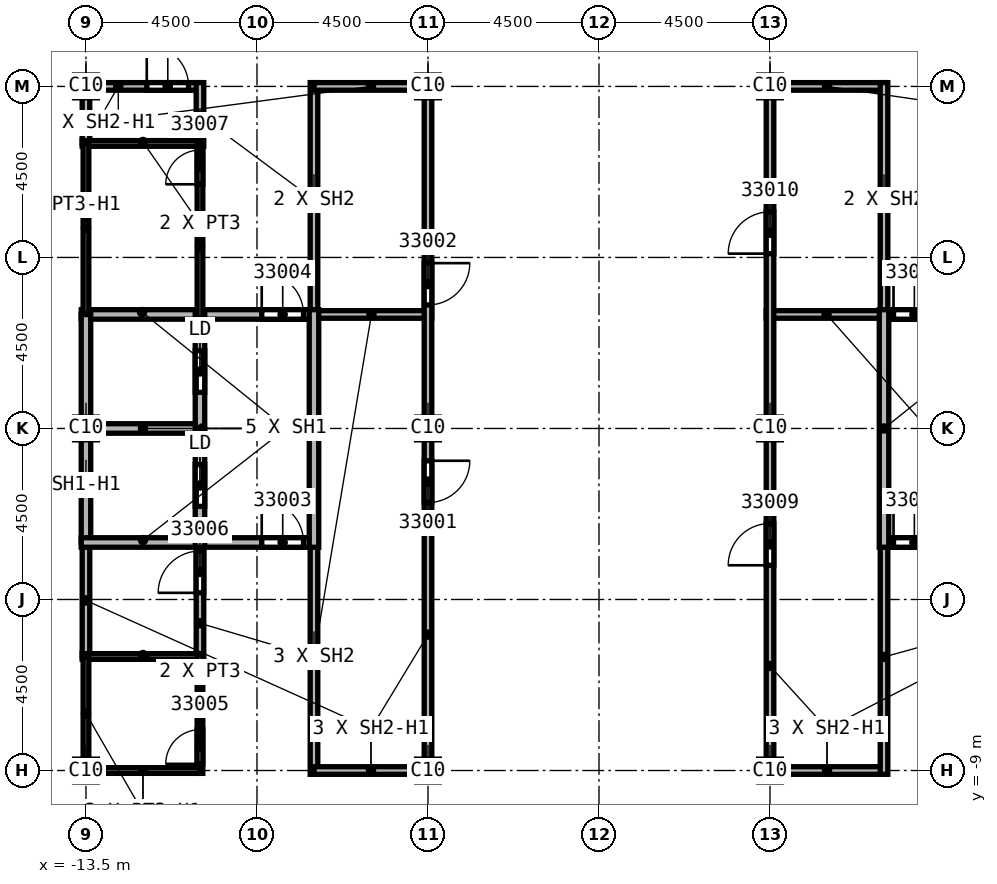
"""IFC4 building model, lengths in metres.
Left out: names, types, materials, properties, quantities, classifications, styles, units other than length and angle.
Written with IfcOpenShell. Run it as: python <this file> out.ifc"""

import sys

from ifc_helpers import new_model, si_unit, direction, frame, frame_2d, origin, origin_2d, place, context, subcontext, project, spatial, rectangle, extrude, element, fill, save


model = new_model("IFC4")
c1 = context("Model", 3, precision=1e-05, world=origin(), true_north=direction((0.0, 1.0)))
c2 = subcontext(c1, "Body", "Model", "MODEL_VIEW")
j1 = project(units=[si_unit("LENGTHUNIT", "METRE"), si_unit("PLANEANGLEUNIT", "RADIAN")], contexts=[c1])
p1 = place(None, origin())
s1 = spatial("IfcSite", under=j1, at=p1, CompositionType="ELEMENT")
p2 = place(p1, origin())
s2 = spatial("IfcBuilding", under=s1, at=p2, CompositionType="ELEMENT")
p3 = place(p2, frame((0.0, 0.0, 361.0)))
s3 = spatial("IfcBuildingStorey", under=s2, at=p3, CompositionType="ELEMENT", Elevation=361.0)
for number, where, z_axis, x_axis in (
    (1, (4.5, 0.0, 0.0), (0.0, 0.0, 1.0), (1.0, 0.0, 0.0)),
    (2, (4.5, 9.0, 0.0), (0.0, 0.0, 1.0), (1.0, 0.0, 0.0)),
    (3, (4.5, -9.0, 0.0), (0.0, 0.0, 1.0), (1.0, 0.0, 0.0)),
    (4, (-4.5, 0.0, 0.0), (0.0, 0.0, 1.0), (1.0, 0.0, 0.0)),
    (5, (-4.5, 9.0, 0.0), (0.0, 0.0, 1.0), (1.0, 0.0, 0.0)),
    (6, (-4.5, -9.0, 0.0), (0.0, 0.0, 1.0), (1.0, 0.0, 0.0)),
    (7, (-13.5, 0.0, 0.0), (0.0, 0.0, 1.0), (1.0, 0.0, 0.0)),
    (8, (-13.5, 9.0, 0.0), (0.0, 0.0, 1.0), (1.0, 0.0, 0.0)),
    (9, (-13.5, -9.0, 0.0), (0.0, 0.0, 1.0), (1.0, 0.0, 0.0)),
):
    element("IfcColumn", number, at=place(p3, frame(where, z_axis=z_axis, x_axis=x_axis)), inside=s3, PredefinedType="COLUMN", context=c2, shape_type="SweptSolid", body=[
        extrude(rectangle(XDim=0.6, YDim=0.6, at=origin_2d()), origin(), (0.0, 0.0, 1.0), 4.6),
    ])
p4 = place(p3, frame((-13.5, -6.0, 0.0), z_axis=(0.0, 0.0, 1.0), x_axis=(0.0, 1.0, 0.0)))
e10 = element("IfcWall", 10, at=p4, inside=s3, PredefinedType="SOLIDWALL", context=c2, shape_type="SweptSolid", body=[
    extrude(rectangle(XDim=3.0, YDim=0.2, at=frame_2d((1.5, 0.0))), origin(), (0.0, 0.0, 1.0), 3.838),
])
p5 = place(p3, frame((-13.5, 7.5, 0.0), z_axis=(0.0, 0.0, 1.0), x_axis=(0.0, 1.0, 0.0)))
e11 = element("IfcWall", 11, at=p5, inside=s3, PredefinedType="SOLIDWALL", context=c2, shape_type="SweptSolid", body=[
    extrude(rectangle(XDim=1.6, YDim=0.2, at=frame_2d((0.8, 0.0))), origin(), (0.0, 0.0, 1.0), 3.838),
])
p6 = place(p3, frame((-13.5, 9.0, 0.0), z_axis=(0.0, 0.0, 1.0), x_axis=(1.0, 0.0, 0.0)))
e12 = element("IfcWall", 12, at=p6, inside=s3, PredefinedType="SOLIDWALL", context=c2, shape_type="SweptSolid", body=[
    extrude(rectangle(XDim=3.0, YDim=0.2, at=frame_2d((1.5, 0.0))), origin(), (0.0, 0.0, 1.0), 3.838),
])
p7 = place(p6, frame((1.6, 0.0, 0.0)))
e13 = element("IfcOpeningElement", 13, at=p7, cuts=e12, PredefinedType="OPENING", context=c2, shape_type="SweptSolid", body=[
    extrude(rectangle(XDim=1.1, YDim=2.1, at=frame_2d((0.55, 1.05))), frame((0.0, 0.1, 0.0), z_axis=(0.0, -1.0, 0.0), x_axis=(1.0, 0.0, 0.0)), (0.0, 0.0, 1.0), 0.2),
])
p8 = place(p3, frame((-10.5, -6.075, 0.0), z_axis=(0.0, 0.0, 1.0), x_axis=(0.0, 1.0, 0.0)))
e14 = element("IfcWall", 14, at=p8, inside=s3, PredefinedType="SOLIDWALL", context=c2, shape_type="SweptSolid", body=[
    extrude(rectangle(XDim=3.2, YDim=0.2, at=frame_2d((1.6, 0.0))), origin(), (0.0, 0.0, 1.0), 4.15),
])
p9 = place(p8, frame((1.75, 0.0, 0.0)))
e15 = element("IfcOpeningElement", 15, at=p9, cuts=e14, PredefinedType="OPENING", context=c2, shape_type="SweptSolid", body=[
    extrude(rectangle(XDim=1.1, YDim=2.1, at=frame_2d((0.55, 1.05))), frame((0.0, 0.1, 0.0), z_axis=(0.0, -1.0, 0.0), x_axis=(1.0, 0.0, 0.0)), (0.0, 0.0, 1.0), 0.2),
])
p10 = place(p3, frame((-10.5, 7.425, 0.0), z_axis=(0.0, 0.0, 1.0), x_axis=(0.0, 1.0, 0.0)))
e16 = element("IfcWall", 16, at=p10, inside=s3, PredefinedType="SOLIDWALL", context=c2, shape_type="SweptSolid", body=[
    extrude(rectangle(XDim=1.675, YDim=0.2, at=frame_2d((0.837, 0.0))), origin(), (0.0, 0.0, 1.0), 4.15),
])
p11 = place(p3, frame((-7.625, 3.0, 0.0), z_axis=(0.0, 0.0, 1.0), x_axis=(1.0, 0.0, 0.0)))
e17 = element("IfcWall", 17, at=p11, inside=s3, PredefinedType="SOLIDWALL", context=c2, shape_type="SweptSolid", body=[
    extrude(rectangle(XDim=3.225, YDim=0.2, at=frame_2d((1.613, 0.0))), origin(), (0.0, 0.0, 1.0), 4.15),
])
for number, where, z_axis, x_axis in (
    (18, (-7.5, -9.1, 0.0), (0.0, 0.0, 1.0), (0.0, 1.0, 0.0)),
    (19, (-7.5, 2.875, 0.0), (0.0, 0.0, 1.0), (0.0, 1.0, 0.0)),
):
    element("IfcWall", number, at=place(p3, frame(where, z_axis=z_axis, x_axis=x_axis)), inside=s3, PredefinedType="SOLIDWALL", context=c2, shape_type="SweptSolid", body=[
        extrude(rectangle(XDim=6.225, YDim=0.2, at=frame_2d((3.113, 0.0))), origin(), (0.0, 0.0, 1.0), 4.15),
    ])
for number, where, z_axis, x_axis in (
    (20, (-7.5, 9.0, 0.0), (0.0, 0.0, 1.0), (1.0, 0.0, 0.0)),
    (21, (-4.5, -9.0, 0.0), (0.0, 0.0, 1.0), (-1.0, 0.0, 0.0)),
):
    element("IfcWall", number, at=place(p3, frame(where, z_axis=z_axis, x_axis=x_axis)), inside=s3, PredefinedType="SOLIDWALL", context=c2, shape_type="SweptSolid", body=[
        extrude(rectangle(XDim=3.0, YDim=0.2, at=frame_2d((1.5, 0.0))), origin(), (0.0, 0.0, 1.0), 3.838),
    ])
p12 = place(p3, frame((-4.5, 9.1, 0.0), z_axis=(0.0, 0.0, 1.0), x_axis=(0.0, -1.0, 0.0)))
e22 = element("IfcWall", 22, at=p12, inside=s3, PredefinedType="SOLIDWALL", context=c2, shape_type="SweptSolid", body=[
    extrude(rectangle(XDim=18.2, YDim=0.2, at=frame_2d((9.1, 0.0))), origin(), (0.0, 0.0, 1.0), 3.838),
])
p13 = place(p12, frame((9.95, 0.0, 0.0)))
e23 = element("IfcOpeningElement", 23, at=p13, cuts=e22, PredefinedType="OPENING", context=c2, shape_type="SweptSolid", body=[
    extrude(rectangle(XDim=1.1, YDim=2.1, at=frame_2d((0.55, 1.05))), frame((0.0, 0.1, 0.0), z_axis=(0.0, -1.0, 0.0), x_axis=(1.0, 0.0, 0.0)), (0.0, 0.0, 1.0), 0.2),
])
p14 = place(p12, frame((4.75, 0.0, 0.0)))
e24 = element("IfcOpeningElement", 24, at=p14, cuts=e22, PredefinedType="OPENING", context=c2, shape_type="SweptSolid", body=[
    extrude(rectangle(XDim=1.1, YDim=2.1, at=frame_2d((0.55, 1.05))), frame((0.0, 0.1, 0.0), z_axis=(0.0, -1.0, 0.0), x_axis=(1.0, 0.0, 0.0)), (0.0, 0.0, 1.0), 0.2),
])
p15 = place(p3, frame((4.4, 3.0, 0.0), z_axis=(0.0, 0.0, 1.0), x_axis=(1.0, 0.0, 0.0)))
e25 = element("IfcWall", 25, at=p15, inside=s3, PredefinedType="SOLIDWALL", context=c2, shape_type="SweptSolid", body=[
    extrude(rectangle(XDim=3.225, YDim=0.2, at=frame_2d((1.613, 0.0))), origin(), (0.0, 0.0, 1.0), 4.15),
])
p16 = place(p3, frame((4.5, -9.1, 0.0), z_axis=(0.0, 0.0, 1.0), x_axis=(0.0, 1.0, 0.0)))
e26 = element("IfcWall", 26, at=p16, inside=s3, PredefinedType="SOLIDWALL", context=c2, shape_type="SweptSolid", body=[
    extrude(rectangle(XDim=18.2, YDim=0.2, at=frame_2d((9.1, 0.0))), origin(), (0.0, 0.0, 1.0), 3.838),
])
p17 = place(p16, frame((5.5, 0.0, 0.0)))
e27 = element("IfcOpeningElement", 27, at=p17, cuts=e26, PredefinedType="OPENING", context=c2, shape_type="SweptSolid", body=[
    extrude(rectangle(XDim=1.1, YDim=2.1, at=frame_2d((0.55, 1.05))), frame((0.0, 0.1, 0.0), z_axis=(0.0, -1.0, 0.0), x_axis=(1.0, 0.0, 0.0)), (0.0, 0.0, 1.0), 0.2),
])
p18 = place(p16, frame((13.7, 0.0, 0.0)))
e28 = element("IfcOpeningElement", 28, at=p18, cuts=e26, PredefinedType="OPENING", context=c2, shape_type="SweptSolid", body=[
    extrude(rectangle(XDim=1.1, YDim=2.1, at=frame_2d((0.55, 1.05))), frame((0.0, 0.1, 0.0), z_axis=(0.0, -1.0, 0.0), x_axis=(1.0, 0.0, 0.0)), (0.0, 0.0, 1.0), 0.2),
])
for number, where, z_axis, x_axis in (
    (29, (4.5, 9.0, 0.0), (0.0, 0.0, 1.0), (1.0, 0.0, 0.0)),
    (30, (7.5, -9.0, 0.0), (0.0, 0.0, 1.0), (-1.0, 0.0, 0.0)),
):
    element("IfcWall", number, at=place(p3, frame(where, z_axis=z_axis, x_axis=x_axis)), inside=s3, PredefinedType="SOLIDWALL", context=c2, shape_type="SweptSolid", body=[
        extrude(rectangle(XDim=3.0, YDim=0.2, at=frame_2d((1.5, 0.0))), origin(), (0.0, 0.0, 1.0), 3.838),
    ])
for number, where, z_axis, x_axis in (
    (31, (7.5, -2.875, 0.0), (0.0, 0.0, 1.0), (0.0, -1.0, 0.0)),
    (32, (7.5, 9.1, 0.0), (0.0, 0.0, 1.0), (0.0, -1.0, 0.0)),
):
    element("IfcWall", number, at=place(p3, frame(where, z_axis=z_axis, x_axis=x_axis)), inside=s3, PredefinedType="SOLIDWALL", context=c2, shape_type="SweptSolid", body=[
        extrude(rectangle(XDim=6.225, YDim=0.2, at=frame_2d((3.113, 0.0))), origin(), (0.0, 0.0, 1.0), 4.15),
    ])
p19 = place(p3, frame((-13.625, 0.0, 0.0), z_axis=(0.0, 0.0, 1.0), x_axis=(1.0, 0.0, 0.0)))
e33 = element("IfcWall", 33, at=p19, inside=s3, PredefinedType="SOLIDWALL", context=c2, shape_type="SweptSolid", body=[
    extrude(rectangle(XDim=3.125, YDim=0.25, at=frame_2d((1.562, 0.0))), origin(), (0.0, 0.0, 1.0), 4.15),
])
p20 = place(p3, frame((-13.625, 3.0, 0.0), z_axis=(0.0, 0.0, 1.0), x_axis=(1.0, 0.0, 0.0)))
e34 = element("IfcWall", 34, at=p20, inside=s3, PredefinedType="SOLIDWALL", context=c2, shape_type="SweptSolid", body=[
    extrude(rectangle(XDim=6.125, YDim=0.25, at=frame_2d((3.062, 0.0))), origin(), (0.0, 0.0, 1.0), 4.15),
])
p21 = place(p20, frame((4.75, 0.0, 0.0)))
e35 = element("IfcOpeningElement", 35, at=p21, cuts=e34, PredefinedType="OPENING", context=c2, shape_type="SweptSolid", body=[
    extrude(rectangle(XDim=1.1, YDim=2.1, at=frame_2d((0.55, 1.05))), frame((0.0, 0.125, 0.0), z_axis=(0.0, -1.0, 0.0), x_axis=(1.0, 0.0, 0.0)), (0.0, 0.0, 1.0), 0.25),
])
p22 = place(p3, frame((-13.5, -3.0, 0.0), z_axis=(0.0, 0.0, 1.0), x_axis=(0.0, 1.0, 0.0)))
e36 = element("IfcWall", 36, at=p22, inside=s3, PredefinedType="SOLIDWALL", context=c2, shape_type="SweptSolid", body=[
    extrude(rectangle(XDim=6.0, YDim=0.25, at=frame_2d((3.0, 0.0))), origin(), (0.0, 0.0, 1.0), 3.838),
])
p23 = place(p3, frame((-13.625, -3.0, 0.0), z_axis=(0.0, 0.0, 1.0), x_axis=(1.0, 0.0, 0.0)))
e37 = element("IfcWall", 37, at=p23, inside=s3, PredefinedType="SOLIDWALL", context=c2, shape_type="SweptSolid", body=[
    extrude(rectangle(XDim=6.125, YDim=0.25, at=frame_2d((3.062, 0.0))), origin(), (0.0, 0.0, 1.0), 4.15),
])
p24 = place(p23, frame((4.75, 0.0, 0.0)))
e38 = element("IfcOpeningElement", 38, at=p24, cuts=e37, PredefinedType="OPENING", context=c2, shape_type="SweptSolid", body=[
    extrude(rectangle(XDim=1.1, YDim=2.1, at=frame_2d((0.55, 1.05))), frame((0.0, 0.125, 0.0), z_axis=(0.0, -1.0, 0.0), x_axis=(1.0, 0.0, 0.0)), (0.0, 0.0, 1.0), 0.25),
])
p25 = place(p3, frame((-10.5, -3.125, 0.0), z_axis=(0.0, 0.0, 1.0), x_axis=(0.0, 1.0, 0.0)))
e39 = element("IfcWall", 39, at=p25, inside=s3, PredefinedType="SOLIDWALL", context=c2, shape_type="SweptSolid", body=[
    extrude(rectangle(XDim=6.25, YDim=0.25, at=frame_2d((3.125, 0.0))), origin(), (0.0, 0.0, 1.0), 4.15),
])
p26 = place(p25, frame((1.075, 0.0, 0.0)))
e40 = element("IfcOpeningElement", 40, at=p26, cuts=e39, PredefinedType="OPENING", context=c2, shape_type="SweptSolid", body=[
    extrude(rectangle(XDim=1.1, YDim=2.1, at=frame_2d((0.55, 1.05))), frame((0.0, 0.125, 0.0), z_axis=(0.0, -1.0, 0.0), x_axis=(1.0, 0.0, 0.0)), (0.0, 0.0, 1.0), 0.25),
])
p27 = place(p25, frame((4.075, 0.0, 0.0)))
e41 = element("IfcOpeningElement", 41, at=p27, cuts=e39, PredefinedType="OPENING", context=c2, shape_type="SweptSolid", body=[
    extrude(rectangle(XDim=1.1, YDim=2.1, at=frame_2d((0.55, 1.05))), frame((0.0, 0.125, 0.0), z_axis=(0.0, -1.0, 0.0), x_axis=(1.0, 0.0, 0.0)), (0.0, 0.0, 1.0), 0.25),
])
p28 = place(p3, frame((-7.5, -3.125, 0.0), z_axis=(0.0, 0.0, 1.0), x_axis=(0.0, 1.0, 0.0)))
e42 = element("IfcWall", 42, at=p28, inside=s3, PredefinedType="SOLIDWALL", context=c2, shape_type="SweptSolid", body=[
    extrude(rectangle(XDim=6.25, YDim=0.25, at=frame_2d((3.125, 0.0))), origin(), (0.0, 0.0, 1.0), 4.15),
])
p29 = place(p3, frame((7.5, -3.0, 0.0), z_axis=(0.0, 0.0, 1.0), x_axis=(1.0, 0.0, 0.0)))
e43 = element("IfcWall", 43, at=p29, inside=s3, PredefinedType="SOLIDWALL", context=c2, shape_type="SweptSolid", body=[
    extrude(rectangle(XDim=6.125, YDim=0.25, at=frame_2d((3.062, 0.0))), origin(), (0.0, 0.0, 1.0), 4.15),
])
p30 = place(p29, frame((0.25, 0.0, 0.0)))
e44 = element("IfcOpeningElement", 44, at=p30, cuts=e43, PredefinedType="OPENING", context=c2, shape_type="SweptSolid", body=[
    extrude(rectangle(XDim=1.1, YDim=2.1, at=frame_2d((0.55, 1.05))), frame((0.0, 0.125, 0.0), z_axis=(0.0, -1.0, 0.0), x_axis=(1.0, 0.0, 0.0)), (0.0, 0.0, 1.0), 0.25),
])
p31 = place(p3, frame((7.5, 3.0, 0.0), z_axis=(0.0, 0.0, 1.0), x_axis=(1.0, 0.0, 0.0)))
e45 = element("IfcWall", 45, at=p31, inside=s3, PredefinedType="SOLIDWALL", context=c2, shape_type="SweptSolid", body=[
    extrude(rectangle(XDim=6.125, YDim=0.25, at=frame_2d((3.062, 0.0))), origin(), (0.0, 0.0, 1.0), 4.15),
])
p32 = place(p31, frame((0.25, 0.0, 0.0)))
e46 = element("IfcOpeningElement", 46, at=p32, cuts=e45, PredefinedType="OPENING", context=c2, shape_type="SweptSolid", body=[
    extrude(rectangle(XDim=1.1, YDim=2.1, at=frame_2d((0.55, 1.05))), frame((0.0, 0.125, 0.0), z_axis=(0.0, -1.0, 0.0), x_axis=(1.0, 0.0, 0.0)), (0.0, 0.0, 1.0), 0.25),
])
p33 = place(p3, frame((7.5, 3.125, 0.0), z_axis=(0.0, 0.0, 1.0), x_axis=(0.0, -1.0, 0.0)))
e47 = element("IfcWall", 47, at=p33, inside=s3, PredefinedType="SOLIDWALL", context=c2, shape_type="SweptSolid", body=[
    extrude(rectangle(XDim=6.25, YDim=0.25, at=frame_2d((3.125, 0.0))), origin(), (0.0, 0.0, 1.0), 4.15),
])
for number, where, z_axis, x_axis in (
    (48, (-13.6, -6.0, 0.0), (0.0, 0.0, 1.0), (1.0, 0.0, 0.0)),
    (49, (-13.6, 7.5, 0.0), (0.0, 0.0, 1.0), (1.0, 0.0, 0.0)),
):
    element("IfcWall", number, at=place(p3, frame(where, z_axis=z_axis, x_axis=x_axis)), inside=s3, PredefinedType="PARTITIONING", context=c2, shape_type="SweptSolid", body=[
        extrude(rectangle(XDim=3.1, YDim=0.15, at=frame_2d((1.55, 0.0))), origin(), (0.0, 0.0, 1.0), 4.15),
    ])
p34 = place(p3, frame((-13.5, -9.075, 0.0), z_axis=(0.0, 0.0, 1.0), x_axis=(0.0, 1.0, 0.0)))
e50 = element("IfcWall", 50, at=p34, inside=s3, PredefinedType="PARTITIONING", context=c2, shape_type="SweptSolid", body=[
    extrude(rectangle(XDim=3.075, YDim=0.15, at=frame_2d((1.538, 0.0))), origin(), (0.0, 0.0, 1.0), 3.838),
])
p35 = place(p3, frame((-13.5, 3.0, 0.0), z_axis=(0.0, 0.0, 1.0), x_axis=(0.0, 1.0, 0.0)))
e51 = element("IfcWall", 51, at=p35, inside=s3, PredefinedType="PARTITIONING", context=c2, shape_type="SweptSolid", body=[
    extrude(rectangle(XDim=4.5, YDim=0.15, at=frame_2d((2.25, 0.0))), origin(), (0.0, 0.0, 1.0), 3.838),
])
p36 = place(p3, frame((-10.5, -9.075, 0.0), z_axis=(0.0, 0.0, 1.0), x_axis=(0.0, 1.0, 0.0)))
e52 = element("IfcWall", 52, at=p36, inside=s3, PredefinedType="PARTITIONING", context=c2, shape_type="SweptSolid", body=[
    extrude(rectangle(XDim=3.15, YDim=0.15, at=frame_2d((1.575, 0.0))), origin(), (0.0, 0.0, 1.0), 4.15),
])
p37 = place(p36, frame((0.25, 0.0, 0.0)))
e53 = element("IfcOpeningElement", 53, at=p37, cuts=e52, PredefinedType="OPENING", context=c2, shape_type="SweptSolid", body=[
    extrude(rectangle(XDim=0.9, YDim=2.1, at=frame_2d((0.45, 1.05))), frame((0.0, 0.075, 0.0), z_axis=(0.0, -1.0, 0.0), x_axis=(1.0, 0.0, 0.0)), (0.0, 0.0, 1.0), 0.15),
])
p38 = place(p3, frame((-10.5, -9.0, 0.0), z_axis=(0.0, 0.0, 1.0), x_axis=(-1.0, 0.0, 0.0)))
e54 = element("IfcWall", 54, at=p38, inside=s3, PredefinedType="PARTITIONING", context=c2, shape_type="SweptSolid", body=[
    extrude(rectangle(XDim=3.0, YDim=0.15, at=frame_2d((1.5, 0.0))), origin(), (0.0, 0.0, 1.0), 3.838),
])
p39 = place(p3, frame((-10.5, 2.875, 0.0), z_axis=(0.0, 0.0, 1.0), x_axis=(0.0, 1.0, 0.0)))
e55 = element("IfcWall", 55, at=p39, inside=s3, PredefinedType="PARTITIONING", context=c2, shape_type="SweptSolid", body=[
    extrude(rectangle(XDim=4.7, YDim=0.15, at=frame_2d((2.35, 0.0))), origin(), (0.0, 0.0, 1.0), 4.15),
])
p40 = place(p39, frame((3.55, 0.0, 0.0)))
e56 = element("IfcOpeningElement", 56, at=p40, cuts=e55, PredefinedType="OPENING", context=c2, shape_type="SweptSolid", body=[
    extrude(rectangle(XDim=0.9, YDim=2.1, at=frame_2d((0.45, 1.05))), frame((0.0, 0.075, 0.0), z_axis=(0.0, -1.0, 0.0), x_axis=(1.0, 0.0, 0.0)), (0.0, 0.0, 1.0), 0.15),
])
p41 = place(p13, origin())
e57 = element("IfcDoor", 57, at=p41, inside=s3, OperationType="SINGLE_SWING_RIGHT", PredefinedType="DOOR", context=c2, shape_type="SweptSolid", body=[
    extrude(rectangle(XDim=1.1, YDim=2.1, at=frame_2d((0.55, 1.05))), frame((0.0, 0.025, 0.0), z_axis=(0.0, -1.0, 0.0), x_axis=(1.0, 0.0, 0.0)), (0.0, 0.0, 1.0), 0.05),
])
fill(e23, e57)
p42 = place(p14, origin())
e58 = element("IfcDoor", 58, at=p42, inside=s3, OperationType="SINGLE_SWING_LEFT", PredefinedType="DOOR", context=c2, shape_type="SweptSolid", body=[
    extrude(rectangle(XDim=1.1, YDim=2.1, at=frame_2d((0.55, 1.05))), frame((0.0, 0.025, 0.0), z_axis=(0.0, -1.0, 0.0), x_axis=(1.0, 0.0, 0.0)), (0.0, 0.0, 1.0), 0.05),
])
fill(e24, e58)
p43 = place(p24, origin())
e59 = element("IfcDoor", 59, at=p43, inside=s3, OperationType="SINGLE_SWING_RIGHT", PredefinedType="DOOR", context=c2, shape_type="SweptSolid", body=[
    extrude(rectangle(XDim=1.1, YDim=2.1, at=frame_2d((0.55, 1.05))), frame((0.0, 0.025, 0.0), z_axis=(0.0, -1.0, 0.0), x_axis=(1.0, 0.0, 0.0)), (0.0, 0.0, 1.0), 0.05),
])
fill(e38, e59)
p44 = place(p21, origin())
e60 = element("IfcDoor", 60, at=p44, inside=s3, OperationType="SINGLE_SWING_LEFT", PredefinedType="DOOR", context=c2, shape_type="SweptSolid", body=[
    extrude(rectangle(XDim=1.1, YDim=2.1, at=frame_2d((0.55, 1.05))), frame((0.0, 0.025, 0.0), z_axis=(0.0, -1.0, 0.0), x_axis=(1.0, 0.0, 0.0)), (0.0, 0.0, 1.0), 0.05),
])
fill(e35, e60)
p45 = place(p37, origin())
e61 = element("IfcDoor", 61, at=p45, inside=s3, OperationType="SINGLE_SWING_RIGHT", PredefinedType="DOOR", context=c2, shape_type="SweptSolid", body=[
    extrude(rectangle(XDim=0.9, YDim=2.1, at=frame_2d((0.45, 1.05))), frame((0.0, 0.025, 0.0), z_axis=(0.0, -1.0, 0.0), x_axis=(1.0, 0.0, 0.0)), (0.0, 0.0, 1.0), 0.05),
])
fill(e53, e61)
p46 = place(p9, origin())
e62 = element("IfcDoor", 62, at=p46, inside=s3, OperationType="SINGLE_SWING_LEFT", PredefinedType="DOOR", context=c2, shape_type="SweptSolid", body=[
    extrude(rectangle(XDim=1.1, YDim=2.1, at=frame_2d((0.55, 1.05))), frame((0.0, 0.025, 0.0), z_axis=(0.0, -1.0, 0.0), x_axis=(1.0, 0.0, 0.0)), (0.0, 0.0, 1.0), 0.05),
])
fill(e15, e62)
p47 = place(p40, origin())
e63 = element("IfcDoor", 63, at=p47, inside=s3, OperationType="SINGLE_SWING_RIGHT", PredefinedType="DOOR", context=c2, shape_type="SweptSolid", body=[
    extrude(rectangle(XDim=0.9, YDim=2.1, at=frame_2d((0.45, 1.05))), frame((0.0, 0.025, 0.0), z_axis=(0.0, -1.0, 0.0), x_axis=(1.0, 0.0, 0.0)), (0.0, 0.0, 1.0), 0.05),
])
fill(e56, e63)
p48 = place(p7, origin())
e64 = element("IfcDoor", 64, at=p48, inside=s3, OperationType="SINGLE_SWING_LEFT", PredefinedType="DOOR", context=c2, shape_type="SweptSolid", body=[
    extrude(rectangle(XDim=1.1, YDim=2.1, at=frame_2d((0.55, 1.05))), frame((0.0, 0.025, 0.0), z_axis=(0.0, -1.0, 0.0), x_axis=(1.0, 0.0, 0.0)), (0.0, 0.0, 1.0), 0.05),
])
fill(e13, e64)
p49 = place(p17, origin())
e65 = element("IfcDoor", 65, at=p49, inside=s3, OperationType="SINGLE_SWING_RIGHT", PredefinedType="DOOR", context=c2, shape_type="SweptSolid", body=[
    extrude(rectangle(XDim=1.1, YDim=2.1, at=frame_2d((0.55, 1.05))), frame((0.0, 0.025, 0.0), z_axis=(0.0, -1.0, 0.0), x_axis=(1.0, 0.0, 0.0)), (0.0, 0.0, 1.0), 0.05),
])
fill(e27, e65)
p50 = place(p18, origin())
e66 = element("IfcDoor", 66, at=p50, inside=s3, OperationType="SINGLE_SWING_LEFT", PredefinedType="DOOR", context=c2, shape_type="SweptSolid", body=[
    extrude(rectangle(XDim=1.1, YDim=2.1, at=frame_2d((0.55, 1.05))), frame((0.0, 0.025, 0.0), z_axis=(0.0, -1.0, 0.0), x_axis=(1.0, 0.0, 0.0)), (0.0, 0.0, 1.0), 0.05),
])
fill(e28, e66)
p51 = place(p30, origin())
e67 = element("IfcDoor", 67, at=p51, inside=s3, OperationType="SINGLE_SWING_RIGHT", PredefinedType="DOOR", context=c2, shape_type="SweptSolid", body=[
    extrude(rectangle(XDim=1.1, YDim=2.1, at=frame_2d((0.55, 1.05))), frame((0.0, 0.025, 0.0), z_axis=(0.0, -1.0, 0.0), x_axis=(1.0, 0.0, 0.0)), (0.0, 0.0, 1.0), 0.05),
])
fill(e44, e67)
p52 = place(p32, origin())
e68 = element("IfcDoor", 68, at=p52, inside=s3, OperationType="SINGLE_SWING_LEFT", PredefinedType="DOOR", context=c2, shape_type="SweptSolid", body=[
    extrude(rectangle(XDim=1.1, YDim=2.1, at=frame_2d((0.55, 1.05))), frame((0.0, 0.025, 0.0), z_axis=(0.0, -1.0, 0.0), x_axis=(1.0, 0.0, 0.0)), (0.0, 0.0, 1.0), 0.05),
])
fill(e46, e68)
p53 = place(p26, origin())
e69 = element("IfcDoor", 69, at=p53, inside=s3, OperationType="SLIDING_TO_LEFT", PredefinedType="DOOR", context=c2, shape_type="SweptSolid", body=[
    extrude(rectangle(XDim=1.1, YDim=2.1, at=frame_2d((0.55, 1.05))), frame((0.0, 0.025, 0.0), z_axis=(0.0, -1.0, 0.0), x_axis=(1.0, 0.0, 0.0)), (0.0, 0.0, 1.0), 0.05),
])
fill(e40, e69)
p54 = place(p27, origin())
e70 = element("IfcDoor", 70, at=p54, inside=s3, OperationType="SLIDING_TO_LEFT", PredefinedType="DOOR", context=c2, shape_type="SweptSolid", body=[
    extrude(rectangle(XDim=1.1, YDim=2.1, at=frame_2d((0.55, 1.05))), frame((0.0, 0.025, 0.0), z_axis=(0.0, -1.0, 0.0), x_axis=(1.0, 0.0, 0.0)), (0.0, 0.0, 1.0), 0.05),
])
fill(e41, e70)
save(model, sys.argv[1])
